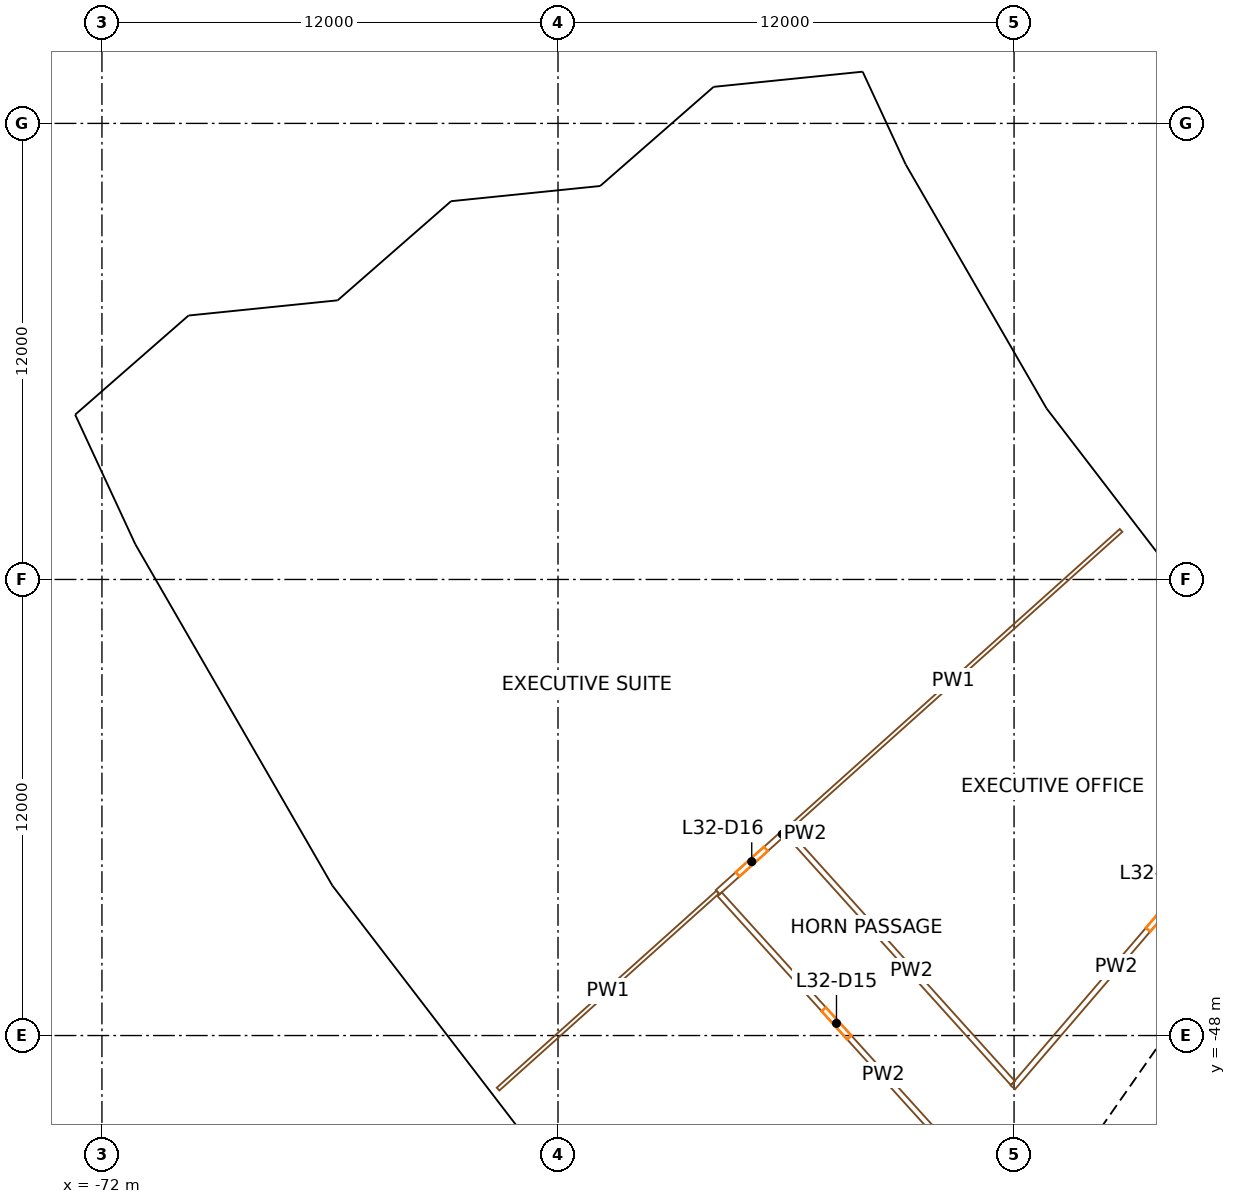
"""IFC4 building model, lengths in metres.
Left out: names, types, materials, properties, quantities, classifications, styles, units other than length and angle.
Written with IfcOpenShell. Run it as: python <this file> out.ifc"""

import sys

from ifc_helpers import new_model, si_unit, direction, frame, frame_2d, origin, origin_2d, place, context, subcontext, project, spatial, rectangle, extrude, element, fill, save


model = new_model("IFC4")
c1 = context("Model", 3, precision=1e-05, world=origin(), true_north=direction((0.0, 1.0)))
c2 = subcontext(c1, "Body", "Model", "MODEL_VIEW")
j1 = project(units=[si_unit("LENGTHUNIT", "METRE"), si_unit("PLANEANGLEUNIT", "RADIAN")], contexts=[c1])
p1 = place(None, origin())
s1 = spatial("IfcSite", under=j1, at=p1, CompositionType="ELEMENT")
p2 = place(p1, origin())
s2 = spatial("IfcBuilding", under=s1, at=p2, CompositionType="ELEMENT")
p3 = place(p2, frame((0.0, 0.0, 140.5)))
s3 = spatial("IfcBuildingStorey", under=s2, at=p3, CompositionType="ELEMENT", Elevation=140.5)
for number, where, z_axis, x_axis in (
    (1, (-52.243, -25.763, 0.0), (0.0, 0.0, 1.0), (0.442, -0.897, 0.0)),
    (2, (-69.732, -34.388, 0.0), (0.0, 0.0, 1.0), (0.442, -0.897, 0.0)),
    (3, (-48.433, -32.362, 0.0), (0.0, 0.0, 1.0), (0.556, -0.831, 0.0)),
    (4, (-64.647, -43.196, 0.0), (0.0, 0.0, 1.0), (0.556, -0.831, 0.0)),
    (5, (-43.795, -38.407, 0.0), (0.0, 0.0, 1.0), (0.659, -0.752, 0.0)),
    (6, (-58.456, -51.264, 0.0), (0.0, 0.0, 1.0), (0.659, -0.752, 0.0)),
):
    element("IfcColumn", number, at=place(p3, frame(where, z_axis=z_axis, x_axis=x_axis)), inside=s3, PredefinedType="COLUMN", context=c2, shape_type="SweptSolid", body=[
        extrude(rectangle(XDim=1.2, YDim=1.5, at=origin_2d()), origin(), (0.0, 0.0, 1.0), 3.8),
    ])
p4 = place(p3, frame((-49.779, -57.191, 0.0), z_axis=(0.0, 0.0, 1.0), x_axis=(0.573577477574, 0.819151315216, 0.0)))
e7 = element("IfcWall", 7, at=p4, inside=s3, PredefinedType="SHEAR", context=c2, shape_type="SweptSolid", body=[
    extrude(rectangle(XDim=14.8, YDim=0.9, at=frame_2d((7.4, 0.0))), origin(), (0.0, 0.0, 1.0), 3.4),
])
p5 = place(p4, frame((6.7, 0.0, 0.0)))
e8 = element("IfcOpeningElement", 8, at=p5, cuts=e7, PredefinedType="OPENING", context=c2, shape_type="SweptSolid", body=[
    extrude(rectangle(XDim=1.4, YDim=2.1, at=frame_2d((0.7, 1.05))), frame((0.0, 0.46, 0.0), z_axis=(0.0, -1.0, 0.0), x_axis=(1.0, 0.0, 0.0)), (0.0, 0.0, 1.0), 0.92),
])
p6 = place(p3, frame((-52.355, -22.878, 0.0), z_axis=(0.0, 0.0, 1.0), x_axis=(-0.99486451318, -0.101215613493, 0.0)))
e9 = element("IfcWall", 9, at=p6, inside=s3, PredefinedType="SOLIDWALL", context=c2, shape_type="SweptSolid", body=[
    extrude(rectangle(XDim=3.276, YDim=0.4, at=frame_2d((1.638, 0.0))), origin(), (0.0, 0.0, 1.0), 2.7),
])
p7 = place(p6, frame((0.638, 0.0, 0.9)))
e10 = element("IfcOpeningElement", 10, at=p7, cuts=e9, PredefinedType="OPENING", context=c2, shape_type="SweptSolid", body=[
    extrude(rectangle(XDim=2.0, YDim=0.95, at=frame_2d((1.0, 0.475))), frame((0.0, 0.21, 0.0), z_axis=(0.0, -1.0, 0.0), x_axis=(1.0, 0.0, 0.0)), (0.0, 0.0, 1.0), 0.42),
])
p8 = place(p3, frame((-55.736, -23.155, 0.0), z_axis=(0.0, 0.0, 1.0), x_axis=(-0.752951562927, -0.65807594082, 0.0)))
e11 = element("IfcWall", 11, at=p8, inside=s3, PredefinedType="SOLIDWALL", context=c2, shape_type="SweptSolid", body=[
    extrude(rectangle(XDim=4.194, YDim=0.4, at=frame_2d((2.097, 0.0))), origin(), (0.0, 0.0, 1.0), 2.7),
])
p9 = place(p8, frame((1.097, 0.0, 0.9)))
e12 = element("IfcOpeningElement", 12, at=p9, cuts=e11, PredefinedType="OPENING", context=c2, shape_type="SweptSolid", body=[
    extrude(rectangle(XDim=2.0, YDim=0.95, at=frame_2d((1.0, 0.475))), frame((0.0, 0.21, 0.0), z_axis=(0.0, -1.0, 0.0), x_axis=(1.0, 0.0, 0.0)), (0.0, 0.0, 1.0), 0.42),
])
p10 = place(p3, frame((-59.015, -25.861, 0.0), z_axis=(0.0, 0.0, 1.0), x_axis=(-0.994852399112, -0.101334613932, 0.0)))
e13 = element("IfcWall", 13, at=p10, inside=s3, PredefinedType="SOLIDWALL", context=c2, shape_type="SweptSolid", body=[
    extrude(rectangle(XDim=3.525, YDim=0.4, at=frame_2d((1.762, 0.0))), origin(), (0.0, 0.0, 1.0), 2.7),
])
p11 = place(p10, frame((0.762, 0.0, 0.9)))
e14 = element("IfcOpeningElement", 14, at=p11, cuts=e13, PredefinedType="OPENING", context=c2, shape_type="SweptSolid", body=[
    extrude(rectangle(XDim=2.0, YDim=0.95, at=frame_2d((1.0, 0.475))), frame((0.0, 0.21, 0.0), z_axis=(0.0, -1.0, 0.0), x_axis=(1.0, 0.0, 0.0)), (0.0, 0.0, 1.0), 0.42),
])
p12 = place(p3, frame((-62.644, -26.164, 0.0), z_axis=(0.0, 0.0, 1.0), x_axis=(-0.752883186222, -0.658154167277, 0.0)))
e15 = element("IfcWall", 15, at=p12, inside=s3, PredefinedType="SOLIDWALL", context=c2, shape_type="SweptSolid", body=[
    extrude(rectangle(XDim=4.193, YDim=0.4, at=frame_2d((2.097, 0.0))), origin(), (0.0, 0.0, 1.0), 2.7),
])
p13 = place(p12, frame((1.097, 0.0, 0.9)))
e16 = element("IfcOpeningElement", 16, at=p13, cuts=e15, PredefinedType="OPENING", context=c2, shape_type="SweptSolid", body=[
    extrude(rectangle(XDim=2.0, YDim=0.95, at=frame_2d((1.0, 0.475))), frame((0.0, 0.21, 0.0), z_axis=(0.0, -1.0, 0.0), x_axis=(1.0, 0.0, 0.0)), (0.0, 0.0, 1.0), 0.42),
])
p14 = place(p3, frame((-65.922, -28.869, 0.0), z_axis=(0.0, 0.0, 1.0), x_axis=(-0.994841275779, -0.101443757849, 0.0)))
e17 = element("IfcWall", 17, at=p14, inside=s3, PredefinedType="SOLIDWALL", context=c2, shape_type="SweptSolid", body=[
    extrude(rectangle(XDim=3.526, YDim=0.4, at=frame_2d((1.763, 0.0))), origin(), (0.0, 0.0, 1.0), 2.7),
])
p15 = place(p14, frame((0.763, 0.0, 0.9)))
e18 = element("IfcOpeningElement", 18, at=p15, cuts=e17, PredefinedType="OPENING", context=c2, shape_type="SweptSolid", body=[
    extrude(rectangle(XDim=2.0, YDim=0.95, at=frame_2d((1.0, 0.475))), frame((0.0, 0.21, 0.0), z_axis=(0.0, -1.0, 0.0), x_axis=(1.0, 0.0, 0.0)), (0.0, 0.0, 1.0), 0.42),
])
p16 = place(p3, frame((-69.551, -29.172, 0.0), z_axis=(0.0, 0.0, 1.0), x_axis=(-0.752847949113, -0.658194473933, 0.0)))
e19 = element("IfcWall", 19, at=p16, inside=s3, PredefinedType="SOLIDWALL", context=c2, shape_type="SweptSolid", body=[
    extrude(rectangle(XDim=4.013, YDim=0.4, at=frame_2d((2.007, 0.0))), origin(), (0.0, 0.0, 1.0), 2.7),
])
p17 = place(p16, frame((1.007, 0.0, 0.9)))
e20 = element("IfcOpeningElement", 20, at=p17, cuts=e19, PredefinedType="OPENING", context=c2, shape_type="SweptSolid", body=[
    extrude(rectangle(XDim=2.0, YDim=0.95, at=frame_2d((1.0, 0.475))), frame((0.0, 0.21, 0.0), z_axis=(0.0, -1.0, 0.0), x_axis=(1.0, 0.0, 0.0)), (0.0, 0.0, 1.0), 0.42),
])
p18 = place(p3, frame((-51.024, -25.184, 0.0), z_axis=(0.0, 0.0, 1.0), x_axis=(-0.420942341964, 0.907087396419, 0.0)))
e21 = element("IfcWall", 21, at=p18, inside=s3, PredefinedType="SOLIDWALL", context=c2, shape_type="SweptSolid", body=[
    extrude(rectangle(XDim=2.76, YDim=0.4, at=frame_2d((1.38, 0.0))), origin(), (0.0, 0.0, 1.0), 2.7),
])
p19 = place(p3, frame((-47.336, -31.568, 0.0), z_axis=(0.0, 0.0, 1.0), x_axis=(-0.499994443168, 0.866028611999, 0.0)))
e22 = element("IfcWall", 22, at=p19, inside=s3, PredefinedType="SOLIDWALL", context=c2, shape_type="SweptSolid", body=[
    extrude(rectangle(XDim=7.355, YDim=0.4, at=frame_2d((3.678, 0.0))), origin(), (0.0, 0.0, 1.0), 2.7),
])
p20 = place(p19, frame((4.225, 0.0, 0.9)))
e23 = element("IfcOpeningElement", 23, at=p20, cuts=e22, PredefinedType="OPENING", context=c2, shape_type="SweptSolid", body=[
    extrude(rectangle(XDim=2.6, YDim=1.65, at=frame_2d((1.3, 0.825))), frame((0.0, 0.21, 0.0), z_axis=(0.0, -1.0, 0.0), x_axis=(1.0, 0.0, 0.0)), (0.0, 0.0, 1.0), 0.42),
])
p21 = place(p19, frame((0.517, 0.0, 0.9)))
e24 = element("IfcOpeningElement", 24, at=p21, cuts=e22, PredefinedType="OPENING", context=c2, shape_type="SweptSolid", body=[
    extrude(rectangle(XDim=2.6, YDim=1.65, at=frame_2d((1.3, 0.825))), frame((0.0, 0.21, 0.0), z_axis=(0.0, -1.0, 0.0), x_axis=(1.0, 0.0, 0.0)), (0.0, 0.0, 1.0), 0.42),
])
p22 = place(p3, frame((-42.765, -37.537, 0.0), z_axis=(0.0, 0.0, 1.0), x_axis=(-0.608748204711, 0.793363487476, 0.0)))
e25 = element("IfcWall", 25, at=p22, inside=s3, PredefinedType="SOLIDWALL", context=c2, shape_type="SweptSolid", body=[
    extrude(rectangle(XDim=7.493, YDim=0.4, at=frame_2d((3.747, 0.0))), origin(), (0.0, 0.0, 1.0), 2.7),
])
p23 = place(p22, frame((4.301, 0.0, 0.9)))
e26 = element("IfcOpeningElement", 26, at=p23, cuts=e25, PredefinedType="OPENING", context=c2, shape_type="SweptSolid", body=[
    extrude(rectangle(XDim=2.6, YDim=1.65, at=frame_2d((1.3, 0.825))), frame((0.0, 0.21, 0.0), z_axis=(0.0, -1.0, 0.0), x_axis=(1.0, 0.0, 0.0)), (0.0, 0.0, 1.0), 0.42),
])
p24 = place(p22, frame((0.592, 0.0, 0.9)))
e27 = element("IfcOpeningElement", 27, at=p24, cuts=e25, PredefinedType="OPENING", context=c2, shape_type="SweptSolid", body=[
    extrude(rectangle(XDim=2.6, YDim=1.65, at=frame_2d((1.3, 0.825))), frame((0.0, 0.21, 0.0), z_axis=(0.0, -1.0, 0.0), x_axis=(1.0, 0.0, 0.0)), (0.0, 0.0, 1.0), 0.42),
])
p25 = place(p3, frame((-61.577, -49.409, 0.0), z_axis=(0.0, 0.0, 1.0), x_axis=(0.744495585519, 0.667627383457, 0.0)))
e28 = element("IfcWall", 28, at=p25, inside=s3, PredefinedType="PARTITIONING", context=c2, shape_type="SweptSolid", body=[
    extrude(rectangle(XDim=7.762, YDim=0.1, at=frame_2d((3.881, 0.0))), origin(), (0.0, 0.0, 1.0), 2.4),
])
p26 = place(p3, frame((-55.798, -44.227, 0.0), z_axis=(0.0, 0.0, 1.0), x_axis=(0.744539856865, 0.667578011576, 0.0)))
e29 = element("IfcWall", 29, at=p26, inside=s3, PredefinedType="PARTITIONING", context=c2, shape_type="SweptSolid", body=[
    extrude(rectangle(XDim=2.405, YDim=0.15, at=frame_2d((1.202, 0.0))), origin(), (0.0, 0.0, 1.0), 2.4),
])
p27 = place(p26, frame((0.702, 0.0, 0.0)))
e30 = element("IfcOpeningElement", 30, at=p27, cuts=e29, PredefinedType="OPENING", context=c2, shape_type="SweptSolid", body=[
    extrude(rectangle(XDim=1.0, YDim=2.1, at=frame_2d((0.5, 1.05))), frame((0.0, 0.085, 0.0), z_axis=(0.0, -1.0, 0.0), x_axis=(1.0, 0.0, 0.0)), (0.0, 0.0, 1.0), 0.17),
])
p28 = place(p3, frame((-54.008, -42.622, 0.0), z_axis=(0.0, 0.0, 1.0), x_axis=(0.744502704069, 0.667619445219, 0.0)))
e31 = element("IfcWall", 31, at=p28, inside=s3, PredefinedType="PARTITIONING", context=c2, shape_type="SweptSolid", body=[
    extrude(rectangle(XDim=11.851, YDim=0.1, at=frame_2d((5.925, 0.0))), origin(), (0.0, 0.0, 1.0), 2.4),
])
p29 = place(p3, frame((-49.598, -51.076, 0.0), z_axis=(0.0, 0.0, 1.0), x_axis=(-0.671105149511, 0.741362177549, 0.0)))
e32 = element("IfcWall", 32, at=p29, inside=s3, PredefinedType="PARTITIONING", context=c2, shape_type="SweptSolid", body=[
    extrude(rectangle(XDim=9.164, YDim=0.15, at=frame_2d((4.582, 0.0))), origin(), (0.0, 0.0, 1.0), 2.4),
])
p30 = place(p29, frame((4.082, 0.0, 0.0)))
e33 = element("IfcOpeningElement", 33, at=p30, cuts=e32, PredefinedType="OPENING", context=c2, shape_type="SweptSolid", body=[
    extrude(rectangle(XDim=1.0, YDim=2.1, at=frame_2d((0.5, 1.05))), frame((0.0, 0.085, 0.0), z_axis=(0.0, -1.0, 0.0), x_axis=(1.0, 0.0, 0.0)), (0.0, 0.0, 1.0), 0.17),
])
p31 = place(p3, frame((-48.032, -49.251, 0.0), z_axis=(0.0, 0.0, 1.0), x_axis=(-0.669505645027, 0.742806967709, 0.0)))
e34 = element("IfcWall", 34, at=p31, inside=s3, PredefinedType="PARTITIONING", context=c2, shape_type="SweptSolid", body=[
    extrude(rectangle(XDim=8.85, YDim=0.15, at=frame_2d((4.425, 0.0))), origin(), (0.0, 0.0, 1.0), 2.4),
])
p32 = place(p3, frame((-48.031, -49.364, 0.0), z_axis=(0.0, 0.0, 1.0), x_axis=(0.650981860867, 0.759093285982, 0.0)))
e35 = element("IfcWall", 35, at=p32, inside=s3, PredefinedType="PARTITIONING", context=c2, shape_type="SweptSolid", body=[
    extrude(rectangle(XDim=11.926, YDim=0.15, at=frame_2d((5.963, 0.0))), origin(), (0.0, 0.0, 1.0), 2.4),
])
p33 = place(p32, frame((5.463, 0.0, 0.0)))
e36 = element("IfcOpeningElement", 36, at=p33, cuts=e35, PredefinedType="OPENING", context=c2, shape_type="SweptSolid", body=[
    extrude(rectangle(XDim=1.0, YDim=2.1, at=frame_2d((0.5, 1.05))), frame((0.0, 0.085, 0.0), z_axis=(0.0, -1.0, 0.0), x_axis=(1.0, 0.0, 0.0)), (0.0, 0.0, 1.0), 0.17),
])
p34 = place(p20, origin())
e37 = element("IfcWindow", 37, at=p34, inside=s3, PartitioningType="SINGLE_PANEL", PredefinedType="WINDOW", context=c2, shape_type="SweptSolid", body=[
    extrude(rectangle(XDim=2.6, YDim=1.65, at=frame_2d((1.3, 0.825))), frame((0.0, 0.03, 0.0), z_axis=(0.0, -1.0, 0.0), x_axis=(1.0, 0.0, 0.0)), (0.0, 0.0, 1.0), 0.06),
])
fill(e23, e37)
p35 = place(p21, origin())
e38 = element("IfcWindow", 38, at=p35, inside=s3, PartitioningType="SINGLE_PANEL", PredefinedType="WINDOW", context=c2, shape_type="SweptSolid", body=[
    extrude(rectangle(XDim=2.6, YDim=1.65, at=frame_2d((1.3, 0.825))), frame((0.0, 0.03, 0.0), z_axis=(0.0, -1.0, 0.0), x_axis=(1.0, 0.0, 0.0)), (0.0, 0.0, 1.0), 0.06),
])
fill(e24, e38)
p36 = place(p23, origin())
e39 = element("IfcWindow", 39, at=p36, inside=s3, PartitioningType="SINGLE_PANEL", PredefinedType="WINDOW", context=c2, shape_type="SweptSolid", body=[
    extrude(rectangle(XDim=2.6, YDim=1.65, at=frame_2d((1.3, 0.825))), frame((0.0, 0.03, 0.0), z_axis=(0.0, -1.0, 0.0), x_axis=(1.0, 0.0, 0.0)), (0.0, 0.0, 1.0), 0.06),
])
fill(e26, e39)
p37 = place(p24, origin())
e40 = element("IfcWindow", 40, at=p37, inside=s3, PartitioningType="SINGLE_PANEL", PredefinedType="WINDOW", context=c2, shape_type="SweptSolid", body=[
    extrude(rectangle(XDim=2.6, YDim=1.65, at=frame_2d((1.3, 0.825))), frame((0.0, 0.03, 0.0), z_axis=(0.0, -1.0, 0.0), x_axis=(1.0, 0.0, 0.0)), (0.0, 0.0, 1.0), 0.06),
])
fill(e27, e40)
p38 = place(p7, origin())
e41 = element("IfcWindow", 41, at=p38, inside=s3, PartitioningType="SINGLE_PANEL", PredefinedType="WINDOW", context=c2, shape_type="SweptSolid", body=[
    extrude(rectangle(XDim=2.0, YDim=0.95, at=frame_2d((1.0, 0.475))), frame((0.0, 0.03, 0.0), z_axis=(0.0, -1.0, 0.0), x_axis=(1.0, 0.0, 0.0)), (0.0, 0.0, 1.0), 0.06),
])
fill(e10, e41)
p39 = place(p9, origin())
e42 = element("IfcWindow", 42, at=p39, inside=s3, PartitioningType="SINGLE_PANEL", PredefinedType="WINDOW", context=c2, shape_type="SweptSolid", body=[
    extrude(rectangle(XDim=2.0, YDim=0.95, at=frame_2d((1.0, 0.475))), frame((0.0, 0.03, 0.0), z_axis=(0.0, -1.0, 0.0), x_axis=(1.0, 0.0, 0.0)), (0.0, 0.0, 1.0), 0.06),
])
fill(e12, e42)
p40 = place(p11, origin())
e43 = element("IfcWindow", 43, at=p40, inside=s3, PartitioningType="SINGLE_PANEL", PredefinedType="WINDOW", context=c2, shape_type="SweptSolid", body=[
    extrude(rectangle(XDim=2.0, YDim=0.95, at=frame_2d((1.0, 0.475))), frame((0.0, 0.03, 0.0), z_axis=(0.0, -1.0, 0.0), x_axis=(1.0, 0.0, 0.0)), (0.0, 0.0, 1.0), 0.06),
])
fill(e14, e43)
p41 = place(p13, origin())
e44 = element("IfcWindow", 44, at=p41, inside=s3, PartitioningType="SINGLE_PANEL", PredefinedType="WINDOW", context=c2, shape_type="SweptSolid", body=[
    extrude(rectangle(XDim=2.0, YDim=0.95, at=frame_2d((1.0, 0.475))), frame((0.0, 0.03, 0.0), z_axis=(0.0, -1.0, 0.0), x_axis=(1.0, 0.0, 0.0)), (0.0, 0.0, 1.0), 0.06),
])
fill(e16, e44)
p42 = place(p15, origin())
e45 = element("IfcWindow", 45, at=p42, inside=s3, PartitioningType="SINGLE_PANEL", PredefinedType="WINDOW", context=c2, shape_type="SweptSolid", body=[
    extrude(rectangle(XDim=2.0, YDim=0.95, at=frame_2d((1.0, 0.475))), frame((0.0, 0.03, 0.0), z_axis=(0.0, -1.0, 0.0), x_axis=(1.0, 0.0, 0.0)), (0.0, 0.0, 1.0), 0.06),
])
fill(e18, e45)
p43 = place(p17, origin())
e46 = element("IfcWindow", 46, at=p43, inside=s3, PartitioningType="SINGLE_PANEL", PredefinedType="WINDOW", context=c2, shape_type="SweptSolid", body=[
    extrude(rectangle(XDim=2.0, YDim=0.95, at=frame_2d((1.0, 0.475))), frame((0.0, 0.03, 0.0), z_axis=(0.0, -1.0, 0.0), x_axis=(1.0, 0.0, 0.0)), (0.0, 0.0, 1.0), 0.06),
])
fill(e20, e46)
p44 = place(p33, origin())
e47 = element("IfcDoor", 47, at=p44, inside=s3, OperationType="SINGLE_SWING_RIGHT", PredefinedType="DOOR", context=c2, shape_type="SweptSolid", body=[
    extrude(rectangle(XDim=1.0, YDim=2.1, at=frame_2d((0.5, 1.05))), frame((0.0, 0.025, 0.0), z_axis=(0.0, -1.0, 0.0), x_axis=(1.0, 0.0, 0.0)), (0.0, 0.0, 1.0), 0.05),
])
fill(e36, e47)
p45 = place(p30, origin())
e48 = element("IfcDoor", 48, at=p45, inside=s3, OperationType="SINGLE_SWING_RIGHT", PredefinedType="DOOR", context=c2, shape_type="SweptSolid", body=[
    extrude(rectangle(XDim=1.0, YDim=2.1, at=frame_2d((0.5, 1.05))), frame((0.0, 0.025, 0.0), z_axis=(0.0, -1.0, 0.0), x_axis=(1.0, 0.0, 0.0)), (0.0, 0.0, 1.0), 0.05),
])
fill(e33, e48)
p46 = place(p27, origin())
e49 = element("IfcDoor", 49, at=p46, inside=s3, OperationType="SINGLE_SWING_RIGHT", PredefinedType="DOOR", context=c2, shape_type="SweptSolid", body=[
    extrude(rectangle(XDim=1.0, YDim=2.1, at=frame_2d((0.5, 1.05))), frame((0.0, 0.025, 0.0), z_axis=(0.0, -1.0, 0.0), x_axis=(1.0, 0.0, 0.0)), (0.0, 0.0, 1.0), 0.05),
])
fill(e30, e49)
save(model, sys.argv[1])
